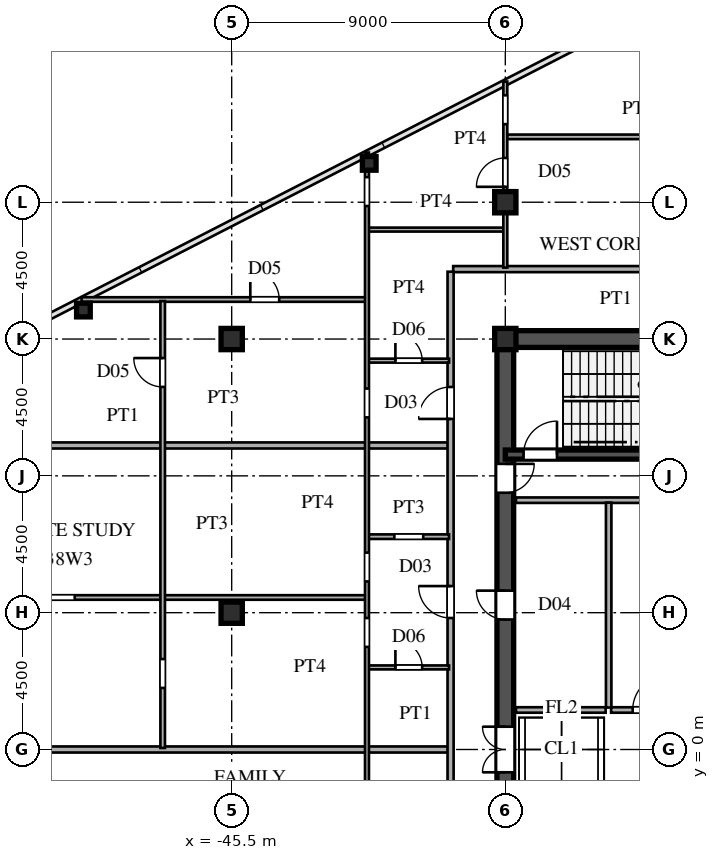
"""IFC4 building model, lengths in metres.
Left out: names, types, materials, properties, quantities, classifications, styles, units other than length and angle.
Written with IfcOpenShell. Run it as: python <this file> out.ifc"""

import sys

from ifc_helpers import new_model, si_unit, direction, frame, frame_2d, origin, origin_2d, place, context, subcontext, project, spatial, rectangle, hollow_rectangle, i_section, extrude, source, transform, mapped, element, fill, save


model = new_model("IFC4")
c1 = context("Model", 3, precision=1e-05, world=origin(), true_north=direction((0.0, 1.0)))
c2 = subcontext(c1, "Body", "Model", "MODEL_VIEW")
j1 = project(units=[si_unit("LENGTHUNIT", "METRE"), si_unit("PLANEANGLEUNIT", "RADIAN")], contexts=[c1])
p1 = place(None, origin())
s1 = spatial("IfcSite", under=j1, at=p1, CompositionType="ELEMENT")
p2 = place(p1, origin())
s2 = spatial("IfcBuilding", under=s1, at=p2, CompositionType="ELEMENT")
p3 = place(p2, frame((0.0, 0.0, 144.0)))
s3 = spatial("IfcBuildingStorey", under=s2, at=p3, CompositionType="ELEMENT", Elevation=144.0)
m1 = source(origin(), c2, "Body", "SweptSolid", [
    extrude(i_section(OverallWidth=0.7, OverallDepth=0.7, WebThickness=0.028, FlangeThickness=0.045, at=origin_2d()), origin(), (0.0, 0.0, 1.0), 3.6),
])
for number, where, z_axis, x_axis in (
    (1, (-36.5, 13.5, 0.0), (0.0, 0.0, 1.0), (1.0, 0.0, 0.0)),
    (2, (-36.5, 18.0, 0.0), (0.0, 0.0, 1.0), (1.0, 0.0, 0.0)),
    (3, (-45.5, 4.5, 0.0), (0.0, 0.0, 1.0), (1.0, 0.0, 0.0)),
    (4, (-45.5, 13.5, 0.0), (0.0, 0.0, 1.0), (1.0, 0.0, 0.0)),
):
    element("IfcColumn", number, at=place(p3, frame(where, z_axis=z_axis, x_axis=x_axis)), inside=s3, PredefinedType="COLUMN", context=c2, shape_type="MappedRepresentation", body=[
        mapped(m1, transform((0.0, 0.0, 0.0), scale=1.0)),
    ])
m2 = source(origin(), c2, "Body", "SweptSolid", [
    extrude(hollow_rectangle(XDim=0.45, YDim=0.45, WallThickness=0.018, at=origin_2d()), origin(), (0.0, 0.0, 1.0), 3.6),
])
for number, where, z_axis, x_axis in (
    (5, (-40.976, 19.278, 0.0), (0.0, 0.0, 1.0), (1.0, 0.0, 0.0)),
    (6, (-50.377, 14.453, 0.0), (0.0, 0.0, 1.0), (1.0, 0.0, 0.0)),
):
    element("IfcColumn", number, at=place(p3, frame(where, z_axis=z_axis, x_axis=x_axis)), inside=s3, PredefinedType="COLUMN", context=c2, shape_type="MappedRepresentation", body=[
        mapped(m2, transform((0.0, 0.0, 0.0), scale=1.0)),
    ])
p4 = place(p3, frame((-36.5, 13.5, 0.0), z_axis=(0.0, 0.0, 1.0), x_axis=(1.0, 0.0, 0.0)))
e7 = element("IfcWall", 7, at=p4, inside=s3, PredefinedType="SHEAR", context=c2, shape_type="SweptSolid", body=[
    extrude(rectangle(XDim=9.0, YDim=0.55, at=frame_2d((4.5, 0.0))), origin(), (0.0, 0.0, 1.0), 3.38),
])
p5 = place(p3, frame((-36.5, -1.3, 0.0), z_axis=(0.0, 0.0, 1.0), x_axis=(0.0, 1.0, 0.0)))
e8 = element("IfcWall", 8, at=p5, inside=s3, PredefinedType="SHEAR", context=c2, shape_type="SweptSolid", body=[
    extrude(rectangle(XDim=2.6, YDim=0.55, at=frame_2d((1.3, 0.0))), origin(), (0.0, 0.0, 1.0), 3.38),
])
p6 = place(p5, frame((0.55, 0.0, 0.0)))
e9 = element("IfcOpeningElement", 9, at=p6, cuts=e8, PredefinedType="OPENING", context=c2, shape_type="SweptSolid", body=[
    extrude(rectangle(XDim=1.5, YDim=2.3, at=frame_2d((0.75, 1.15))), frame((0.0, 0.285, 0.0), z_axis=(0.0, -1.0, 0.0), x_axis=(1.0, 0.0, 0.0)), (0.0, 0.0, 1.0), 0.57),
])
p7 = place(p3, frame((-36.5, 8.2, 0.0), z_axis=(0.0, 0.0, 1.0), x_axis=(0.0, 1.0, 0.0)))
e10 = element("IfcWall", 10, at=p7, inside=s3, PredefinedType="SHEAR", context=c2, shape_type="SweptSolid", body=[
    extrude(rectangle(XDim=5.45, YDim=0.55, at=frame_2d((2.725, 0.0))), origin(), (0.0, 0.0, 1.0), 3.38),
])
p8 = place(p7, frame((0.245, 0.0, 0.0)))
e11 = element("IfcOpeningElement", 11, at=p8, cuts=e10, PredefinedType="OPENING", context=c2, shape_type="SweptSolid", body=[
    extrude(rectangle(XDim=0.95, YDim=2.15, at=frame_2d((0.475, 1.075))), frame((0.0, 0.285, 0.0), z_axis=(0.0, -1.0, 0.0), x_axis=(1.0, 0.0, 0.0)), (0.0, 0.0, 1.0), 0.57),
])
p9 = place(p3, frame((-36.5, 1.3, 0.0), z_axis=(0.0, 0.0, 1.0), x_axis=(0.0, 1.0, 0.0)))
e12 = element("IfcWall", 12, at=p9, inside=s3, PredefinedType="SHEAR", context=c2, shape_type="SweptSolid", body=[
    extrude(rectangle(XDim=6.9, YDim=0.55, at=frame_2d((3.45, 0.0))), origin(), (0.0, 0.0, 1.0), 3.38),
])
p10 = place(p9, frame((2.975, 0.0, 0.0)))
e13 = element("IfcOpeningElement", 13, at=p10, cuts=e12, PredefinedType="OPENING", context=c2, shape_type="SweptSolid", body=[
    extrude(rectangle(XDim=0.95, YDim=2.15, at=frame_2d((0.475, 1.075))), frame((0.0, 0.285, 0.0), z_axis=(0.0, -1.0, 0.0), x_axis=(1.0, 0.0, 0.0)), (0.0, 0.0, 1.0), 0.57),
])
p11 = place(p3, frame((-36.5, 9.7, 0.0), z_axis=(0.0, 0.0, 1.0), x_axis=(1.0, 0.0, 0.0)))
e14 = element("IfcWall", 14, at=p11, inside=s3, PredefinedType="SHEAR", context=c2, shape_type="SweptSolid", body=[
    extrude(rectangle(XDim=9.0, YDim=0.3, at=frame_2d((4.5, 0.0))), origin(), (0.0, 0.0, 1.0), 3.38),
])
p12 = place(p11, frame((0.6, 0.0, 0.0)))
e15 = element("IfcOpeningElement", 15, at=p12, cuts=e14, PredefinedType="OPENING", context=c2, shape_type="SweptSolid", body=[
    extrude(rectangle(XDim=1.1, YDim=2.2, at=frame_2d((0.55, 1.1))), frame((0.0, 0.16, 0.0), z_axis=(0.0, -1.0, 0.0), x_axis=(1.0, 0.0, 0.0)), (0.0, 0.0, 1.0), 0.32),
])
p13 = place(p3, frame((-36.15, 8.2, 0.0), z_axis=(0.0, 0.0, 1.0), x_axis=(1.0, 0.0, 0.0)))
e16 = element("IfcWall", 16, at=p13, inside=s3, PredefinedType="PARTITIONING", context=c2, shape_type="SweptSolid", body=[
    extrude(rectangle(XDim=5.7, YDim=0.18, at=frame_2d((2.85, 0.0))), origin(), (0.0, 0.0, 1.0), 3.38),
])
p14 = place(p3, frame((-33.1, 1.38, 0.0), z_axis=(0.0, 0.0, 1.0), x_axis=(0.0, 1.0, 0.0)))
e17 = element("IfcWall", 17, at=p14, inside=s3, PredefinedType="PARTITIONING", context=c2, shape_type="SweptSolid", body=[
    extrude(rectangle(XDim=6.74, YDim=0.18, at=frame_2d((3.37, 0.0))), origin(), (0.0, 0.0, 1.0), 3.38),
])
p15 = place(p3, frame((-33.02, 1.3, 0.0), z_axis=(0.0, 0.0, 1.0), x_axis=(1.0, 0.0, 0.0)))
e18 = element("IfcWall", 18, at=p15, inside=s3, PredefinedType="PARTITIONING", context=c2, shape_type="SweptSolid", body=[
    extrude(rectangle(XDim=2.57, YDim=0.18, at=frame_2d((1.285, 0.0))), origin(), (0.0, 0.0, 1.0), 3.38),
])
p16 = place(p15, frame((0.71, 0.0, 0.0)))
e19 = element("IfcOpeningElement", 19, at=p16, cuts=e18, PredefinedType="OPENING", context=c2, shape_type="SweptSolid", body=[
    extrude(rectangle(XDim=1.15, YDim=2.2, at=frame_2d((0.575, 1.1))), frame((0.0, 0.1, 0.0), z_axis=(0.0, -1.0, 0.0), x_axis=(1.0, 0.0, 0.0)), (0.0, 0.0, 1.0), 0.2),
])
p17 = place(p3, frame((-36.15, 1.3, 0.0), z_axis=(0.0, 0.0, 1.0), x_axis=(1.0, 0.0, 0.0)))
e20 = element("IfcWall", 20, at=p17, inside=s3, PredefinedType="PARTITIONING", context=c2, shape_type="SweptSolid", body=[
    extrude(rectangle(XDim=2.95, YDim=0.18, at=frame_2d((1.475, 0.0))), origin(), (0.0, 0.0, 1.0), 3.38),
])
p18 = place(p3, frame((-69.505, 0.0, 0.0), z_axis=(0.0, 0.0, 1.0), x_axis=(1.0, 0.0, 0.0)))
e21 = element("IfcWall", 21, at=p18, inside=s3, PredefinedType="PARTITIONING", context=c2, shape_type="SweptSolid", body=[
    extrude(rectangle(XDim=31.125, YDim=0.2, at=frame_2d((15.562, 0.0))), origin(), (0.0, 0.0, 1.0), 3.38),
])
p19 = place(p3, frame((-41.0, 2.7, 0.0), z_axis=(0.0, 0.0, 1.0), x_axis=(1.0, 0.0, 0.0)))
e22 = element("IfcWall", 22, at=p19, inside=s3, PredefinedType="PARTITIONING", context=c2, shape_type="SweptSolid", body=[
    extrude(rectangle(XDim=2.65, YDim=0.13, at=frame_2d((1.325, 0.0))), origin(), (0.0, 0.0, 1.0), 3.38),
])
p20 = place(p19, frame((0.885, 0.0, 0.0)))
e23 = element("IfcOpeningElement", 23, at=p20, cuts=e22, PredefinedType="OPENING", context=c2, shape_type="SweptSolid", body=[
    extrude(rectangle(XDim=0.88, YDim=2.1, at=frame_2d((0.44, 1.05))), frame((0.0, 0.075, 0.0), z_axis=(0.0, -1.0, 0.0), x_axis=(1.0, 0.0, 0.0)), (0.0, 0.0, 1.0), 0.15),
])
p21 = place(p3, frame((-69.226, 5.0, 0.0), z_axis=(0.0, 0.0, 1.0), x_axis=(1.0, 0.0, 0.0)))
e24 = element("IfcWall", 24, at=p21, inside=s3, PredefinedType="PARTITIONING", context=c2, shape_type="SweptSolid", body=[
    extrude(rectangle(XDim=28.126, YDim=0.15, at=frame_2d((14.063, 0.0))), origin(), (0.0, 0.0, 1.0), 3.38),
])
p22 = place(p21, frame((11.401, 0.0, 0.0)))
e25 = element("IfcOpeningElement", 25, at=p22, cuts=e24, PredefinedType="OPENING", context=c2, shape_type="SweptSolid", body=[
    extrude(rectangle(XDim=0.95, YDim=2.15, at=frame_2d((0.475, 1.075))), frame((0.0, 0.085, 0.0), z_axis=(0.0, -1.0, 0.0), x_axis=(1.0, 0.0, 0.0)), (0.0, 0.0, 1.0), 0.17),
])
p23 = place(p21, frame((17.614, 0.0, 0.0)))
e26 = element("IfcOpeningElement", 26, at=p23, cuts=e24, PredefinedType="OPENING", context=c2, shape_type="SweptSolid", body=[
    extrude(rectangle(XDim=0.95, YDim=2.15, at=frame_2d((0.475, 1.075))), frame((0.0, 0.085, 0.0), z_axis=(0.0, -1.0, 0.0), x_axis=(1.0, 0.0, 0.0)), (0.0, 0.0, 1.0), 0.17),
])
p24 = place(p3, frame((-41.0, 7.0, 0.0), z_axis=(0.0, 0.0, 1.0), x_axis=(1.0, 0.0, 0.0)))
e27 = element("IfcWall", 27, at=p24, inside=s3, PredefinedType="PARTITIONING", context=c2, shape_type="SweptSolid", body=[
    extrude(rectangle(XDim=2.65, YDim=0.15, at=frame_2d((1.325, 0.0))), origin(), (0.0, 0.0, 1.0), 3.38),
])
p25 = place(p24, frame((0.85, 0.0, 0.0)))
e28 = element("IfcOpeningElement", 28, at=p25, cuts=e27, PredefinedType="OPENING", context=c2, shape_type="SweptSolid", body=[
    extrude(rectangle(XDim=0.95, YDim=2.15, at=frame_2d((0.475, 1.075))), frame((0.0, 0.085, 0.0), z_axis=(0.0, -1.0, 0.0), x_axis=(1.0, 0.0, 0.0)), (0.0, 0.0, 1.0), 0.17),
])
p26 = place(p3, frame((-59.767, 10.0, 0.0), z_axis=(0.0, 0.0, 1.0), x_axis=(1.0, 0.0, 0.0)))
e29 = element("IfcWall", 29, at=p26, inside=s3, PredefinedType="PARTITIONING", context=c2, shape_type="SweptSolid", body=[
    extrude(rectangle(XDim=21.387, YDim=0.2, at=frame_2d((10.694, 0.0))), origin(), (0.0, 0.0, 1.0), 3.38),
])
p27 = place(p3, frame((-41.0, 12.79, 0.0), z_axis=(0.0, 0.0, 1.0), x_axis=(1.0, 0.0, 0.0)))
e30 = element("IfcWall", 30, at=p27, inside=s3, PredefinedType="PARTITIONING", context=c2, shape_type="SweptSolid", body=[
    extrude(rectangle(XDim=2.65, YDim=0.13, at=frame_2d((1.325, 0.0))), origin(), (0.0, 0.0, 1.0), 3.38),
])
p28 = place(p27, frame((0.885, 0.0, 0.0)))
e31 = element("IfcOpeningElement", 31, at=p28, cuts=e30, PredefinedType="OPENING", context=c2, shape_type="SweptSolid", body=[
    extrude(rectangle(XDim=0.88, YDim=2.1, at=frame_2d((0.44, 1.05))), frame((0.0, 0.075, 0.0), z_axis=(0.0, -1.0, 0.0), x_axis=(1.0, 0.0, 0.0)), (0.0, 0.0, 1.0), 0.15),
])
p29 = place(p3, frame((-50.438, 14.8, 0.0), z_axis=(0.0, 0.0, 1.0), x_axis=(1.0, 0.0, 0.0)))
e32 = element("IfcWall", 32, at=p29, inside=s3, PredefinedType="PARTITIONING", context=c2, shape_type="SweptSolid", body=[
    extrude(rectangle(XDim=9.338, YDim=0.15, at=frame_2d((4.669, 0.0))), origin(), (0.0, 0.0, 1.0), 3.38),
])
p30 = place(p29, frame((5.551, 0.0, 0.0)))
e33 = element("IfcOpeningElement", 33, at=p30, cuts=e32, PredefinedType="OPENING", context=c2, shape_type="SweptSolid", body=[
    extrude(rectangle(XDim=0.95, YDim=2.15, at=frame_2d((0.475, 1.075))), frame((0.0, 0.085, 0.0), z_axis=(0.0, -1.0, 0.0), x_axis=(1.0, 0.0, 0.0)), (0.0, 0.0, 1.0), 0.17),
])
p31 = place(p3, frame((-38.215, 15.8, 0.0), z_axis=(0.0, 0.0, 1.0), x_axis=(1.0, 0.0, 0.0)))
e34 = element("IfcWall", 34, at=p31, inside=s3, PredefinedType="PARTITIONING", context=c2, shape_type="SweptSolid", body=[
    extrude(rectangle(XDim=10.715, YDim=0.2, at=frame_2d((5.357, 0.0))), origin(), (0.0, 0.0, 1.0), 3.38),
])
p32 = place(p3, frame((-41.0, 17.1, 0.0), z_axis=(0.0, 0.0, 1.0), x_axis=(1.0, 0.0, 0.0)))
e35 = element("IfcWall", 35, at=p32, inside=s3, PredefinedType="PARTITIONING", context=c2, shape_type="SweptSolid", body=[
    extrude(rectangle(XDim=4.45, YDim=0.13, at=frame_2d((2.225, 0.0))), origin(), (0.0, 0.0, 1.0), 3.38),
])
p33 = place(p3, frame((-36.45, 20.15, 0.0), z_axis=(0.0, 0.0, 1.0), x_axis=(1.0, 0.0, 0.0)))
e36 = element("IfcWall", 36, at=p33, inside=s3, PredefinedType="PARTITIONING", context=c2, shape_type="SweptSolid", body=[
    extrude(rectangle(XDim=8.649, YDim=0.15, at=frame_2d((4.325, 0.0))), origin(), (0.0, 0.0, 1.0), 3.38),
])
p34 = place(p3, frame((-47.77, 0.05, 0.0), z_axis=(0.0, 0.0, 1.0), x_axis=(0.0, 1.0, 0.0)))
e37 = element("IfcWall", 37, at=p34, inside=s3, PredefinedType="PARTITIONING", context=c2, shape_type="SweptSolid", body=[
    extrude(rectangle(XDim=14.7, YDim=0.15, at=frame_2d((7.35, 0.0))), origin(), (0.0, 0.0, 1.0), 3.38),
])
p35 = place(p34, frame((1.975, 0.0, 0.0)))
e38 = element("IfcOpeningElement", 38, at=p35, cuts=e37, PredefinedType="OPENING", context=c2, shape_type="SweptSolid", body=[
    extrude(rectangle(XDim=0.95, YDim=2.15, at=frame_2d((0.475, 1.075))), frame((0.0, 0.085, 0.0), z_axis=(0.0, -1.0, 0.0), x_axis=(1.0, 0.0, 0.0)), (0.0, 0.0, 1.0), 0.17),
])
p36 = place(p34, frame((11.875, 0.0, 0.0)))
e39 = element("IfcOpeningElement", 39, at=p36, cuts=e37, PredefinedType="OPENING", context=c2, shape_type="SweptSolid", body=[
    extrude(rectangle(XDim=0.95, YDim=2.15, at=frame_2d((0.475, 1.075))), frame((0.0, 0.085, 0.0), z_axis=(0.0, -1.0, 0.0), x_axis=(1.0, 0.0, 0.0)), (0.0, 0.0, 1.0), 0.17),
])
p37 = place(p3, frame((-41.05, -3.398, 0.0), z_axis=(0.0, 0.0, 1.0), x_axis=(0.0, 1.0, 0.0)))
e40 = element("IfcWall", 40, at=p37, inside=s3, PredefinedType="PARTITIONING", context=c2, shape_type="SweptSolid", body=[
    extrude(rectangle(XDim=23.032, YDim=0.13, at=frame_2d((11.516, 0.0))), origin(), (0.0, 0.0, 1.0), 2.99),
])
p38 = place(p37, frame((6.772, 0.0, 0.0)))
e41 = element("IfcOpeningElement", 41, at=p38, cuts=e40, PredefinedType="OPENING", context=c2, shape_type="SweptSolid", body=[
    extrude(rectangle(XDim=0.95, YDim=2.15, at=frame_2d((0.475, 1.075))), frame((0.0, 0.075, 0.0), z_axis=(0.0, -1.0, 0.0), x_axis=(1.0, 0.0, 0.0)), (0.0, 0.0, 1.0), 0.15),
])
p39 = place(p37, frame((8.924, 0.0, 0.0)))
e42 = element("IfcOpeningElement", 42, at=p39, cuts=e40, PredefinedType="OPENING", context=c2, shape_type="SweptSolid", body=[
    extrude(rectangle(XDim=0.95, YDim=2.15, at=frame_2d((0.475, 1.075))), frame((0.0, 0.075, 0.0), z_axis=(0.0, -1.0, 0.0), x_axis=(1.0, 0.0, 0.0)), (0.0, 0.0, 1.0), 0.15),
])
p40 = place(p37, frame((14.321, 0.0, 0.0)))
e43 = element("IfcOpeningElement", 43, at=p40, cuts=e40, PredefinedType="OPENING", context=c2, shape_type="SweptSolid", body=[
    extrude(rectangle(XDim=0.95, YDim=2.15, at=frame_2d((0.475, 1.075))), frame((0.0, 0.075, 0.0), z_axis=(0.0, -1.0, 0.0), x_axis=(1.0, 0.0, 0.0)), (0.0, 0.0, 1.0), 0.15),
])
p41 = place(p37, frame((21.273, 0.0, 0.0)))
e44 = element("IfcOpeningElement", 44, at=p41, cuts=e40, PredefinedType="OPENING", context=c2, shape_type="SweptSolid", body=[
    extrude(rectangle(XDim=0.95, YDim=2.15, at=frame_2d((0.475, 1.075))), frame((0.0, 0.075, 0.0), z_axis=(0.0, -1.0, 0.0), x_axis=(1.0, 0.0, 0.0)), (0.0, 0.0, 1.0), 0.15),
])
p42 = place(p3, frame((-38.3, -15.715, 0.0), z_axis=(0.0, 0.0, 1.0), x_axis=(0.0, 1.0, 0.0)))
e45 = element("IfcWall", 45, at=p42, inside=s3, PredefinedType="PARTITIONING", context=c2, shape_type="SweptSolid", body=[
    extrude(rectangle(XDim=31.43, YDim=0.2, at=frame_2d((15.715, 0.0))), origin(), (0.0, 0.0, 1.0), 3.38),
])
p43 = place(p42, frame((2.39, 0.0, 0.0)))
e46 = element("IfcOpeningElement", 46, at=p43, cuts=e45, PredefinedType="OPENING", context=c2, shape_type="SweptSolid", body=[
    extrude(rectangle(XDim=1.05, YDim=2.25, at=frame_2d((0.525, 1.125))), frame((0.0, 0.11, 0.0), z_axis=(0.0, -1.0, 0.0), x_axis=(1.0, 0.0, 0.0)), (0.0, 0.0, 1.0), 0.22),
])
p44 = place(p42, frame((9.268, 0.0, 0.0)))
e47 = element("IfcOpeningElement", 47, at=p44, cuts=e45, PredefinedType="OPENING", context=c2, shape_type="SweptSolid", body=[
    extrude(rectangle(XDim=1.05, YDim=2.25, at=frame_2d((0.525, 1.125))), frame((0.0, 0.11, 0.0), z_axis=(0.0, -1.0, 0.0), x_axis=(1.0, 0.0, 0.0)), (0.0, 0.0, 1.0), 0.22),
])
p45 = place(p42, frame((20.04, 0.0, 0.0)))
e48 = element("IfcOpeningElement", 48, at=p45, cuts=e45, PredefinedType="OPENING", context=c2, shape_type="SweptSolid", body=[
    extrude(rectangle(XDim=1.05, YDim=2.25, at=frame_2d((0.525, 1.125))), frame((0.0, 0.11, 0.0), z_axis=(0.0, -1.0, 0.0), x_axis=(1.0, 0.0, 0.0)), (0.0, 0.0, 1.0), 0.22),
])
p46 = place(p42, frame((26.587, 0.0, 0.0)))
e49 = element("IfcOpeningElement", 49, at=p46, cuts=e45, PredefinedType="OPENING", context=c2, shape_type="SweptSolid", body=[
    extrude(rectangle(XDim=1.05, YDim=2.25, at=frame_2d((0.525, 1.125))), frame((0.0, 0.11, 0.0), z_axis=(0.0, -1.0, 0.0), x_axis=(1.0, 0.0, 0.0)), (0.0, 0.0, 1.0), 0.22),
])
p47 = place(p3, frame((-36.5, 15.85, 0.0), z_axis=(0.0, 0.0, 1.0), x_axis=(0.0, 1.0, 0.0)))
e50 = element("IfcWall", 50, at=p47, inside=s3, PredefinedType="PARTITIONING", context=c2, shape_type="SweptSolid", body=[
    extrude(rectangle(XDim=6.119, YDim=0.13, at=frame_2d((3.06, 0.0))), origin(), (0.0, 0.0, 1.0), 2.78),
])
p48 = place(p47, frame((2.656, 0.0, 0.0)))
e51 = element("IfcOpeningElement", 51, at=p48, cuts=e50, PredefinedType="OPENING", context=c2, shape_type="SweptSolid", body=[
    extrude(rectangle(XDim=0.95, YDim=2.15, at=frame_2d((0.475, 1.075))), frame((0.0, 0.075, 0.0), z_axis=(0.0, -1.0, 0.0), x_axis=(1.0, 0.0, 0.0)), (0.0, 0.0, 1.0), 0.15),
])
p49 = place(p47, frame((4.717, 0.0, 0.0)))
e52 = element("IfcOpeningElement", 52, at=p49, cuts=e50, PredefinedType="OPENING", context=c2, shape_type="SweptSolid", body=[
    extrude(rectangle(XDim=0.95, YDim=2.15, at=frame_2d((0.475, 1.075))), frame((0.0, 0.075, 0.0), z_axis=(0.0, -1.0, 0.0), x_axis=(1.0, 0.0, 0.0)), (0.0, 0.0, 1.0), 0.15),
])
m3 = source(origin(), c2, "Body", "SweptSolid", [
    extrude(rectangle(XDim=1.5, YDim=2.3, at=frame_2d((0.75, 1.15))), frame((0.0, 0.025, 0.0), z_axis=(0.0, -1.0, 0.0), x_axis=(1.0, 0.0, 0.0)), (0.0, 0.0, 1.0), 0.05),
])
p50 = place(p6, origin())
e53 = element("IfcDoor", 53, at=p50, inside=s3, OperationType="DOUBLE_SWING_LEFT", PredefinedType="DOOR", context=c2, shape_type="MappedRepresentation", body=[
    mapped(m3, transform((0.0, 0.0, 0.0), scale=1.0)),
])
fill(e9, e53)
m4 = source(origin(), c2, "Body", "SweptSolid", [
    extrude(rectangle(XDim=0.95, YDim=2.15, at=frame_2d((0.475, 1.075))), frame((0.0, 0.025, 0.0), z_axis=(0.0, -1.0, 0.0), x_axis=(1.0, 0.0, 0.0)), (0.0, 0.0, 1.0), 0.05),
])
p51 = place(p8, frame((0.95, 0.0, 0.0), z_axis=(0.0, 0.0, 1.0), x_axis=(-1.0, 0.0, 0.0)))
e54 = element("IfcDoor", 54, at=p51, inside=s3, OperationType="SINGLE_SWING_RIGHT", PredefinedType="DOOR", context=c2, shape_type="MappedRepresentation", body=[
    mapped(m4, transform((0.0, 0.0, 0.0), scale=1.0)),
])
fill(e11, e54)
p52 = place(p10, origin())
e55 = element("IfcDoor", 55, at=p52, inside=s3, OperationType="SINGLE_SWING_RIGHT", PredefinedType="DOOR", context=c2, shape_type="MappedRepresentation", body=[
    mapped(m4, transform((0.0, 0.0, 0.0), scale=1.0)),
])
fill(e13, e55)
m5 = source(origin(), c2, "Body", "SweptSolid", [
    extrude(rectangle(XDim=1.1, YDim=2.2, at=frame_2d((0.55, 1.1))), frame((0.0, 0.025, 0.0), z_axis=(0.0, -1.0, 0.0), x_axis=(1.0, 0.0, 0.0)), (0.0, 0.0, 1.0), 0.05),
])
p53 = place(p12, origin())
e56 = element("IfcDoor", 56, at=p53, inside=s3, OperationType="SINGLE_SWING_RIGHT", PredefinedType="DOOR", context=c2, shape_type="MappedRepresentation", body=[
    mapped(m5, transform((0.0, 0.0, 0.0), scale=1.0)),
])
fill(e15, e56)
m6 = source(origin(), c2, "Body", "SweptSolid", [
    extrude(rectangle(XDim=1.15, YDim=2.2, at=frame_2d((0.575, 1.1))), frame((0.0, 0.025, 0.0), z_axis=(0.0, -1.0, 0.0), x_axis=(1.0, 0.0, 0.0)), (0.0, 0.0, 1.0), 0.05),
])
p54 = place(p16, origin())
e57 = element("IfcDoor", 57, at=p54, inside=s3, OperationType="SINGLE_SWING_RIGHT", PredefinedType="DOOR", context=c2, shape_type="MappedRepresentation", body=[
    mapped(m6, transform((0.0, 0.0, 0.0), scale=1.0)),
])
fill(e19, e57)
m7 = source(origin(), c2, "Body", "SweptSolid", [
    extrude(rectangle(XDim=0.88, YDim=2.1, at=frame_2d((0.44, 1.05))), frame((0.0, 0.025, 0.0), z_axis=(0.0, -1.0, 0.0), x_axis=(1.0, 0.0, 0.0)), (0.0, 0.0, 1.0), 0.05),
])
p55 = place(p20, origin())
e58 = element("IfcDoor", 58, at=p55, inside=s3, OperationType="SINGLE_SWING_LEFT", PredefinedType="DOOR", context=c2, shape_type="MappedRepresentation", body=[
    mapped(m7, transform((0.0, 0.0, 0.0), scale=1.0)),
])
fill(e23, e58)
p56 = place(p28, origin())
e59 = element("IfcDoor", 59, at=p56, inside=s3, OperationType="SINGLE_SWING_LEFT", PredefinedType="DOOR", context=c2, shape_type="MappedRepresentation", body=[
    mapped(m7, transform((0.0, 0.0, 0.0), scale=1.0)),
])
fill(e31, e59)
m8 = source(origin(), c2, "Body", "SweptSolid", [
    extrude(rectangle(XDim=0.95, YDim=2.15, at=frame_2d((0.475, 1.075))), frame((0.0, 0.025, 0.0), z_axis=(0.0, -1.0, 0.0), x_axis=(1.0, 0.0, 0.0)), (0.0, 0.0, 1.0), 0.05),
])
p57 = place(p30, origin())
e60 = element("IfcDoor", 60, at=p57, inside=s3, OperationType="SINGLE_SWING_LEFT", PredefinedType="DOOR", context=c2, shape_type="MappedRepresentation", body=[
    mapped(m8, transform((0.0, 0.0, 0.0), scale=1.0)),
])
fill(e33, e60)
p58 = place(p36, origin())
e61 = element("IfcDoor", 61, at=p58, inside=s3, OperationType="SINGLE_SWING_RIGHT", PredefinedType="DOOR", context=c2, shape_type="MappedRepresentation", body=[
    mapped(m8, transform((0.0, 0.0, 0.0), scale=1.0)),
])
fill(e39, e61)
m9 = source(origin(), c2, "Body", "SweptSolid", [
    extrude(rectangle(XDim=1.05, YDim=2.25, at=frame_2d((0.525, 1.125))), frame((0.0, 0.025, 0.0), z_axis=(0.0, -1.0, 0.0), x_axis=(1.0, 0.0, 0.0)), (0.0, 0.0, 1.0), 0.05),
])
p59 = place(p45, origin())
e62 = element("IfcDoor", 62, at=p59, inside=s3, OperationType="SINGLE_SWING_RIGHT", PredefinedType="DOOR", context=c2, shape_type="MappedRepresentation", body=[
    mapped(m9, transform((0.0, 0.0, 0.0), scale=1.0)),
])
fill(e48, e62)
p60 = place(p46, origin())
e63 = element("IfcDoor", 63, at=p60, inside=s3, OperationType="SINGLE_SWING_LEFT", PredefinedType="DOOR", context=c2, shape_type="MappedRepresentation", body=[
    mapped(m9, transform((0.0, 0.0, 0.0), scale=1.0)),
])
fill(e49, e63)
p61 = place(p48, origin())
e64 = element("IfcDoor", 64, at=p61, inside=s3, OperationType="SINGLE_SWING_LEFT", PredefinedType="DOOR", context=c2, shape_type="MappedRepresentation", body=[
    mapped(m8, transform((0.0, 0.0, 0.0), scale=1.0)),
])
fill(e51, e64)
save(model, sys.argv[1])
